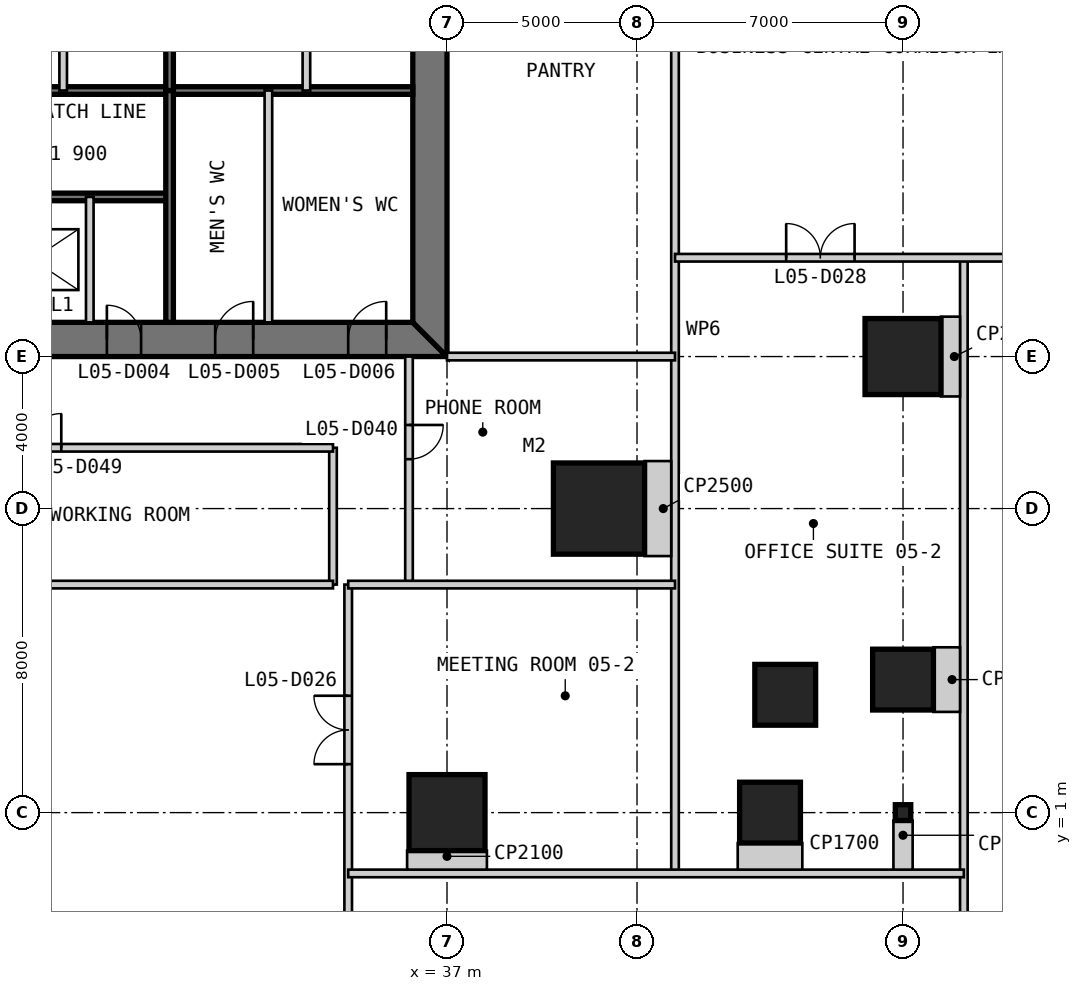
"""IFC4 building model, lengths in metres.
Left out: names, types, materials, properties, quantities, classifications, styles, units other than length and angle.
Written with IfcOpenShell. Run it as: python <this file> out.ifc"""

import sys

from ifc_helpers import new_model, si_unit, direction, frame, frame_2d, origin, origin_2d, place, context, subcontext, project, spatial, polyline, rectangle, i_section, outline, extrude, element, fill, save


model = new_model("IFC4")
c1 = context("Model", 3, precision=1e-05, world=origin(), true_north=direction((0.0, 1.0)))
c2 = subcontext(c1, "Body", "Model", "MODEL_VIEW")
j1 = project(units=[si_unit("LENGTHUNIT", "METRE"), si_unit("PLANEANGLEUNIT", "RADIAN")], contexts=[c1])
p1 = place(None, origin())
s1 = spatial("IfcSite", under=j1, at=p1, CompositionType="ELEMENT")
p2 = place(p1, origin())
s2 = spatial("IfcBuilding", under=s1, at=p2, CompositionType="ELEMENT")
p3 = place(p2, frame((0.0, 0.0, 26.2)))
s3 = spatial("IfcBuildingStorey", under=s2, at=p3, CompositionType="ELEMENT", Elevation=26.2)
p4 = place(p3, frame((41.0, 9.0, 0.0), z_axis=(0.0, 0.0, 1.0), x_axis=(1.0, 0.0, 0.0)))
e1 = element("IfcColumn", 1, at=p4, inside=s3, PredefinedType="COLUMN", context=c2, shape_type="SweptSolid", body=[
    extrude(rectangle(XDim=2.4, YDim=2.4, at=origin_2d()), origin(), (0.0, 0.0, 1.0), 4.8),
])
p5 = place(p3, frame((37.0, 1.0, 0.0), z_axis=(0.0, 0.0, 1.0), x_axis=(1.0, 0.0, 0.0)))
e2 = element("IfcColumn", 2, at=p5, inside=s3, PredefinedType="COLUMN", context=c2, shape_type="SweptSolid", body=[
    extrude(rectangle(XDim=2.0, YDim=2.0, at=origin_2d()), origin(), (0.0, 0.0, 1.0), 4.8),
])
for number, where, z_axis, x_axis in (
    (3, (45.5, 1.0, 0.0), (0.0, 0.0, 1.0), (1.0, 0.0, 0.0)),
    (4, (45.9, 4.1, 0.0), (0.0, 0.0, 1.0), (1.0, 0.0, 0.0)),
    (5, (49.0, 4.5, 0.0), (0.0, 0.0, 1.0), (1.0, 0.0, 0.0)),
):
    element("IfcColumn", number, at=place(p3, frame(where, z_axis=z_axis, x_axis=x_axis)), inside=s3, PredefinedType="COLUMN", context=c2, shape_type="SweptSolid", body=[
        extrude(rectangle(XDim=1.6, YDim=1.6, at=origin_2d()), origin(), (0.0, 0.0, 1.0), 4.8),
    ])
p6 = place(p3, frame((49.0, 13.0, 0.0), z_axis=(0.0, 0.0, 1.0), x_axis=(1.0, 0.0, 0.0)))
e6 = element("IfcColumn", 6, at=p6, inside=s3, PredefinedType="COLUMN", context=c2, shape_type="SweptSolid", body=[
    extrude(rectangle(XDim=2.0, YDim=2.0, at=origin_2d()), origin(), (0.0, 0.0, 1.0), 4.8),
])
p7 = place(p3, frame((49.0, 1.0, 0.0), z_axis=(0.0, 0.0, 1.0), x_axis=(1.0, 0.0, 0.0)))
e7 = element("IfcColumn", 7, at=p7, inside=s3, PredefinedType="COLUMN", context=c2, shape_type="SweptSolid", body=[
    extrude(i_section(OverallWidth=0.406, OverallDepth=0.417, WebThickness=0.03, FlangeThickness=0.048, at=origin_2d()), origin(), (0.0, 0.0, 1.0), 4.8),
])
p8 = place(p3, frame((13.0, 13.45, 0.0), z_axis=(0.0, 0.0, 1.0), x_axis=(1.0, 0.0, 0.0)))
e8 = element("IfcWall", 8, at=p8, inside=s3, PredefinedType="SHEAR", context=c2, shape_type="SweptSolid", body=[
    extrude(outline(polyline([(0.0, -0.45), (24.0, -0.45), (23.1, 0.45), (0.9, 0.45), (0.0, -0.45)])), origin(), (0.0, 0.0, 1.0), 4.8),
])
p9 = place(p8, frame((4.9, 0.0, 0.0)))
e9 = element("IfcOpeningElement", 9, at=p9, cuts=e8, PredefinedType="OPENING", context=c2, shape_type="SweptSolid", body=[
    extrude(rectangle(XDim=1.0, YDim=2.2, at=frame_2d((0.5, 1.1))), frame((0.0, 0.46, 0.0), z_axis=(0.0, -1.0, 0.0), x_axis=(1.0, 0.0, 0.0)), (0.0, 0.0, 1.0), 0.92),
])
p10 = place(p8, frame((8.9, 0.0, 0.0)))
e10 = element("IfcOpeningElement", 10, at=p10, cuts=e8, PredefinedType="OPENING", context=c2, shape_type="SweptSolid", body=[
    extrude(rectangle(XDim=1.1, YDim=2.2, at=frame_2d((0.55, 1.1))), frame((0.0, 0.46, 0.0), z_axis=(0.0, -1.0, 0.0), x_axis=(1.0, 0.0, 0.0)), (0.0, 0.0, 1.0), 0.92),
])
p11 = place(p8, frame((15.05, 0.0, 0.0)))
e11 = element("IfcOpeningElement", 11, at=p11, cuts=e8, PredefinedType="OPENING", context=c2, shape_type="SweptSolid", body=[
    extrude(rectangle(XDim=0.9, YDim=2.2, at=frame_2d((0.45, 1.1))), frame((0.0, 0.46, 0.0), z_axis=(0.0, -1.0, 0.0), x_axis=(1.0, 0.0, 0.0)), (0.0, 0.0, 1.0), 0.92),
])
p12 = place(p8, frame((17.9, 0.0, 0.0)))
e12 = element("IfcOpeningElement", 12, at=p12, cuts=e8, PredefinedType="OPENING", context=c2, shape_type="SweptSolid", body=[
    extrude(rectangle(XDim=1.0, YDim=2.2, at=frame_2d((0.5, 1.1))), frame((0.0, 0.46, 0.0), z_axis=(0.0, -1.0, 0.0), x_axis=(1.0, 0.0, 0.0)), (0.0, 0.0, 1.0), 0.92),
])
p13 = place(p8, frame((21.4, 0.0, 0.0)))
e13 = element("IfcOpeningElement", 13, at=p13, cuts=e8, PredefinedType="OPENING", context=c2, shape_type="SweptSolid", body=[
    extrude(rectangle(XDim=1.0, YDim=2.2, at=frame_2d((0.5, 1.1))), frame((0.0, 0.46, 0.0), z_axis=(0.0, -1.0, 0.0), x_axis=(1.0, 0.0, 0.0)), (0.0, 0.0, 1.0), 0.92),
])
p14 = place(p3, frame((36.55, 13.9, 0.0), z_axis=(0.0, 0.0, 1.0), x_axis=(0.0, 1.0, 0.0)))
e14 = element("IfcWall", 14, at=p14, inside=s3, PredefinedType="SHEAR", context=c2, shape_type="SweptSolid", body=[
    extrude(outline(polyline([(-0.9, -0.45), (23.1, -0.45), (22.2, 0.45), (0.0, 0.45), (-0.9, -0.45)])), origin(), (0.0, 0.0, 1.0), 4.8),
])
p15 = place(p14, frame((20.2, 0.0, 0.0)))
e15 = element("IfcOpeningElement", 15, at=p15, cuts=e14, PredefinedType="OPENING", context=c2, shape_type="SweptSolid", body=[
    extrude(rectangle(XDim=1.0, YDim=2.2, at=frame_2d((0.5, 1.1))), frame((0.0, 0.46, 0.0), z_axis=(0.0, -1.0, 0.0), x_axis=(1.0, 0.0, 0.0)), (0.0, 0.0, 1.0), 0.92),
])
p16 = place(p14, frame((17.25, 0.0, 0.0)))
e16 = element("IfcOpeningElement", 16, at=p16, cuts=e14, PredefinedType="OPENING", context=c2, shape_type="SweptSolid", body=[
    extrude(rectangle(XDim=0.9, YDim=2.2, at=frame_2d((0.45, 1.1))), frame((0.0, 0.46, 0.0), z_axis=(0.0, -1.0, 0.0), x_axis=(1.0, 0.0, 0.0)), (0.0, 0.0, 1.0), 0.92),
])
p17 = place(p3, frame((20.3, 17.2, 0.0), z_axis=(0.0, 0.0, 1.0), x_axis=(1.0, 0.0, 0.0)))
e17 = element("IfcWall", 17, at=p17, inside=s3, PredefinedType="SOLIDWALL", context=c2, shape_type="SweptSolid", body=[
    extrude(rectangle(XDim=9.4, YDim=0.2, at=frame_2d((4.7, 0.0))), origin(), (0.0, 0.0, 1.0), 4.6),
])
p18 = place(p17, frame((0.25, 0.0, 0.0)))
e18 = element("IfcOpeningElement", 18, at=p18, cuts=e17, PredefinedType="OPENING", context=c2, shape_type="SweptSolid", body=[
    extrude(rectangle(XDim=1.0, YDim=2.2, at=frame_2d((0.5, 1.1))), frame((0.0, 0.11, 0.0), z_axis=(0.0, -1.0, 0.0), x_axis=(1.0, 0.0, 0.0)), (0.0, 0.0, 1.0), 0.22),
])
p19 = place(p3, frame((20.3, 20.0, 0.0), z_axis=(0.0, 0.0, 1.0), x_axis=(1.0, 0.0, 0.0)))
e19 = element("IfcWall", 19, at=p19, inside=s3, PredefinedType="SOLIDWALL", context=c2, shape_type="SweptSolid", body=[
    extrude(rectangle(XDim=15.8, YDim=0.2, at=frame_2d((7.9, 0.0))), origin(), (0.0, 0.0, 1.0), 4.6),
])
p20 = place(p3, frame((27.6, 13.9, 0.0), z_axis=(0.0, 0.0, 1.0), x_axis=(0.0, 1.0, 0.0)))
e20 = element("IfcWall", 20, at=p20, inside=s3, PredefinedType="PARTITIONING", context=c2, shape_type="SweptSolid", body=[
    extrude(rectangle(XDim=3.3, YDim=0.2, at=frame_2d((1.65, 0.0))), origin(), (0.0, 0.0, 1.0), 4.6),
])
p21 = place(p3, frame((29.7, 13.9, 0.0), z_axis=(0.0, 0.0, 1.0), x_axis=(0.0, 1.0, 0.0)))
e21 = element("IfcWall", 21, at=p21, inside=s3, PredefinedType="SOLIDWALL", context=c2, shape_type="SweptSolid", body=[
    extrude(rectangle(XDim=6.1, YDim=0.2, at=frame_2d((3.05, 0.0))), origin(), (0.0, 0.0, 1.0), 4.6),
])
p22 = place(p3, frame((32.3, 13.9, 0.0), z_axis=(0.0, 0.0, 1.0), x_axis=(0.0, 1.0, 0.0)))
e22 = element("IfcWall", 22, at=p22, inside=s3, PredefinedType="PARTITIONING", context=c2, shape_type="SweptSolid", body=[
    extrude(rectangle(XDim=6.1, YDim=0.2, at=frame_2d((3.05, 0.0))), origin(), (0.0, 0.0, 1.0), 4.6),
])
p23 = place(p3, frame((33.3, 36.1, 0.0), z_axis=(0.0, 0.0, 1.0), x_axis=(0.0, -1.0, 0.0)))
e23 = element("IfcWall", 23, at=p23, inside=s3, PredefinedType="PARTITIONING", context=c2, shape_type="SweptSolid", body=[
    extrude(rectangle(XDim=16.1, YDim=0.2, at=frame_2d((8.05, 0.0))), origin(), (0.0, 0.0, 1.0), 4.6),
])
p24 = place(p23, frame((4.4, 0.0, 0.0)))
e24 = element("IfcOpeningElement", 24, at=p24, cuts=e23, PredefinedType="OPENING", context=c2, shape_type="SweptSolid", body=[
    extrude(rectangle(XDim=0.9, YDim=2.2, at=frame_2d((0.45, 1.1))), frame((0.0, 0.11, 0.0), z_axis=(0.0, -1.0, 0.0), x_axis=(1.0, 0.0, 0.0)), (0.0, 0.0, 1.0), 0.22),
])
p25 = place(p3, frame((29.7, 36.1, 0.0), z_axis=(0.0, 0.0, 1.0), x_axis=(0.0, -1.0, 0.0)))
e25 = element("IfcWall", 25, at=p25, inside=s3, PredefinedType="SOLIDWALL", context=c2, shape_type="SweptSolid", body=[
    extrude(rectangle(XDim=16.1, YDim=0.2, at=frame_2d((8.05, 0.0))), origin(), (0.0, 0.0, 1.0), 4.6),
])
p26 = place(p3, frame((26.9, 30.0, 0.0), z_axis=(0.0, 0.0, 1.0), x_axis=(0.0, -1.0, 0.0)))
e26 = element("IfcWall", 26, at=p26, inside=s3, PredefinedType="PARTITIONING", context=c2, shape_type="SweptSolid", body=[
    extrude(rectangle(XDim=10.0, YDim=0.2, at=frame_2d((5.0, 0.0))), origin(), (0.0, 0.0, 1.0), 4.6),
])
p27 = place(p3, frame((34.0, 7.0, 0.0), z_axis=(0.0, 0.0, 1.0), x_axis=(0.0, 1.0, 0.0)))
e27 = element("IfcWall", 27, at=p27, inside=s3, PredefinedType="PARTITIONING", context=c2, shape_type="SweptSolid", body=[
    extrude(rectangle(XDim=3.6, YDim=0.2, at=frame_2d((1.8, 0.0))), origin(), (0.0, 0.0, 1.0), 3.893),
])
p28 = place(p3, frame((34.4, -7.25, 0.0), z_axis=(0.0, 0.0, 1.0), x_axis=(0.0, 1.0, 0.0)))
e28 = element("IfcWall", 28, at=p28, inside=s3, PredefinedType="PARTITIONING", context=c2, shape_type="SweptSolid", body=[
    extrude(rectangle(XDim=14.25, YDim=0.2, at=frame_2d((7.125, 0.0))), origin(), (0.0, 0.0, 1.0), 4.5),
])
p29 = place(p28, frame((2.45, 0.0, 0.0)))
e29 = element("IfcOpeningElement", 29, at=p29, cuts=e28, PredefinedType="OPENING", context=c2, shape_type="SweptSolid", body=[
    extrude(rectangle(XDim=1.8, YDim=2.4, at=frame_2d((0.9, 1.2))), frame((0.0, 0.11, 0.0), z_axis=(0.0, -1.0, 0.0), x_axis=(1.0, 0.0, 0.0)), (0.0, 0.0, 1.0), 0.22),
])
p30 = place(p28, frame((9.525, 0.0, 0.0)))
e30 = element("IfcOpeningElement", 30, at=p30, cuts=e28, PredefinedType="OPENING", context=c2, shape_type="SweptSolid", body=[
    extrude(rectangle(XDim=1.8, YDim=2.4, at=frame_2d((0.9, 1.2))), frame((0.0, 0.11, 0.0), z_axis=(0.0, -1.0, 0.0), x_axis=(1.0, 0.0, 0.0)), (0.0, 0.0, 1.0), 0.22),
])
p31 = place(p3, frame((36.0, 7.0, 0.0), z_axis=(0.0, 0.0, 1.0), x_axis=(0.0, 1.0, 0.0)))
e31 = element("IfcWall", 31, at=p31, inside=s3, PredefinedType="PARTITIONING", context=c2, shape_type="SweptSolid", body=[
    extrude(rectangle(XDim=6.0, YDim=0.2, at=frame_2d((3.0, 0.0))), origin(), (0.0, 0.0, 1.0), 4.5),
])
p32 = place(p31, frame((3.3, 0.0, 0.0)))
e32 = element("IfcOpeningElement", 32, at=p32, cuts=e31, PredefinedType="OPENING", context=c2, shape_type="SweptSolid", body=[
    extrude(rectangle(XDim=0.9, YDim=2.2, at=frame_2d((0.45, 1.1))), frame((0.0, 0.11, 0.0), z_axis=(0.0, -1.0, 0.0), x_axis=(1.0, 0.0, 0.0)), (0.0, 0.0, 1.0), 0.22),
])
p33 = place(p3, frame((43.0, -0.6, 0.0), z_axis=(0.0, 0.0, 1.0), x_axis=(0.0, 1.0, 0.0)))
e33 = element("IfcWall", 33, at=p33, inside=s3, PredefinedType="PARTITIONING", context=c2, shape_type="SweptSolid", body=[
    extrude(rectangle(XDim=28.6, YDim=0.2, at=frame_2d((14.3, 0.0))), origin(), (0.0, 0.0, 1.0), 3.893),
])
p34 = place(p3, frame((50.6, -7.25, 0.0), z_axis=(0.0, 0.0, 1.0), x_axis=(0.0, 1.0, 0.0)))
e34 = element("IfcWall", 34, at=p34, inside=s3, PredefinedType="PARTITIONING", context=c2, shape_type="SweptSolid", body=[
    extrude(rectangle(XDim=22.85, YDim=0.2, at=frame_2d((11.425, 0.0))), origin(), (0.0, 0.0, 1.0), 4.5),
])
p35 = place(p3, frame((34.4, -0.6, 0.0), z_axis=(0.0, 0.0, 1.0), x_axis=(1.0, 0.0, 0.0)))
e35 = element("IfcWall", 35, at=p35, inside=s3, PredefinedType="PARTITIONING", context=c2, shape_type="SweptSolid", body=[
    extrude(rectangle(XDim=16.2, YDim=0.2, at=frame_2d((8.1, 0.0))), origin(), (0.0, 0.0, 1.0), 4.5),
])
p36 = place(p3, frame((-0.6, 7.0, 0.0), z_axis=(0.0, 0.0, 1.0), x_axis=(1.0, 0.0, 0.0)))
e36 = element("IfcWall", 36, at=p36, inside=s3, PredefinedType="PARTITIONING", context=c2, shape_type="SweptSolid", body=[
    extrude(rectangle(XDim=34.6, YDim=0.2, at=frame_2d((17.3, 0.0))), origin(), (0.0, 0.0, 1.0), 4.5),
])
p37 = place(p36, frame((14.15, 0.0, 0.0)))
e37 = element("IfcOpeningElement", 37, at=p37, cuts=e36, PredefinedType="OPENING", context=c2, shape_type="SweptSolid", body=[
    extrude(rectangle(XDim=0.9, YDim=2.2, at=frame_2d((0.45, 1.1))), frame((0.0, 0.11, 0.0), z_axis=(0.0, -1.0, 0.0), x_axis=(1.0, 0.0, 0.0)), (0.0, 0.0, 1.0), 0.22),
])
p38 = place(p3, frame((34.4, 7.0, 0.0), z_axis=(0.0, 0.0, 1.0), x_axis=(1.0, 0.0, 0.0)))
e38 = element("IfcWall", 38, at=p38, inside=s3, PredefinedType="PARTITIONING", context=c2, shape_type="SweptSolid", body=[
    extrude(rectangle(XDim=8.6, YDim=0.2, at=frame_2d((4.3, 0.0))), origin(), (0.0, 0.0, 1.0), 4.5),
])
p39 = place(p3, frame((16.4, 10.6, 0.0), z_axis=(0.0, 0.0, 1.0), x_axis=(1.0, 0.0, 0.0)))
e39 = element("IfcWall", 39, at=p39, inside=s3, PredefinedType="PARTITIONING", context=c2, shape_type="SweptSolid", body=[
    extrude(rectangle(XDim=17.6, YDim=0.2, at=frame_2d((8.8, 0.0))), origin(), (0.0, 0.0, 1.0), 4.5),
])
p40 = place(p39, frame((8.65, 0.0, 0.0)))
e40 = element("IfcOpeningElement", 40, at=p40, cuts=e39, PredefinedType="OPENING", context=c2, shape_type="SweptSolid", body=[
    extrude(rectangle(XDim=1.8, YDim=2.4, at=frame_2d((0.9, 1.2))), frame((0.0, 0.11, 0.0), z_axis=(0.0, -1.0, 0.0), x_axis=(1.0, 0.0, 0.0)), (0.0, 0.0, 1.0), 0.22),
])
p41 = place(p3, frame((37.0, 13.0, 0.0), z_axis=(0.0, 0.0, 1.0), x_axis=(1.0, 0.0, 0.0)))
e41 = element("IfcWall", 41, at=p41, inside=s3, PredefinedType="PARTITIONING", context=c2, shape_type="SweptSolid", body=[
    extrude(rectangle(XDim=6.0, YDim=0.2, at=frame_2d((3.0, 0.0))), origin(), (0.0, 0.0, 1.0), 3.703),
])
p42 = place(p3, frame((43.0, 15.6, 0.0), z_axis=(0.0, 0.0, 1.0), x_axis=(1.0, 0.0, 0.0)))
e42 = element("IfcWall", 42, at=p42, inside=s3, PredefinedType="PARTITIONING", context=c2, shape_type="SweptSolid", body=[
    extrude(rectangle(XDim=14.25, YDim=0.2, at=frame_2d((7.125, 0.0))), origin(), (0.0, 0.0, 1.0), 4.5),
])
p43 = place(p42, frame((10.0, 0.0, 0.0)))
e43 = element("IfcOpeningElement", 43, at=p43, cuts=e42, PredefinedType="OPENING", context=c2, shape_type="SweptSolid", body=[
    extrude(rectangle(XDim=1.8, YDim=2.4, at=frame_2d((0.9, 1.2))), frame((0.0, 0.11, 0.0), z_axis=(0.0, -1.0, 0.0), x_axis=(1.0, 0.0, 0.0)), (0.0, 0.0, 1.0), 0.22),
])
p44 = place(p42, frame((2.925, 0.0, 0.0)))
e44 = element("IfcOpeningElement", 44, at=p44, cuts=e42, PredefinedType="OPENING", context=c2, shape_type="SweptSolid", body=[
    extrude(rectangle(XDim=1.8, YDim=2.4, at=frame_2d((0.9, 1.2))), frame((0.0, 0.11, 0.0), z_axis=(0.0, -1.0, 0.0), x_axis=(1.0, 0.0, 0.0)), (0.0, 0.0, 1.0), 0.22),
])
p45 = place(p3, frame((37.0, -0.5, 0.0), z_axis=(0.0, 0.0, 1.0), x_axis=(0.0, 1.0, 0.0)))
e45 = element("IfcWall", 45, at=p45, inside=s3, PredefinedType="PARTITIONING", context=c2, shape_type="SweptSolid", body=[
    extrude(rectangle(XDim=0.5, YDim=2.1, at=frame_2d((0.25, 0.0))), origin(), (0.0, 0.0, 1.0), 4.5),
])
for number, where, z_axis, x_axis in (
    (46, (45.5, -0.5, 0.0), (0.0, 0.0, 1.0), (0.0, 1.0, 0.0)),
    (47, (50.5, 4.5, 0.0), (0.0, 0.0, 1.0), (-1.0, 0.0, 0.0)),
):
    element("IfcWall", number, at=place(p3, frame(where, z_axis=z_axis, x_axis=x_axis)), inside=s3, PredefinedType="PARTITIONING", context=c2, shape_type="SweptSolid", body=[
        extrude(rectangle(XDim=0.7, YDim=1.7, at=frame_2d((0.35, 0.0))), origin(), (0.0, 0.0, 1.0), 4.5),
    ])
p46 = place(p3, frame((50.5, 13.0, 0.0), z_axis=(0.0, 0.0, 1.0), x_axis=(-1.0, 0.0, 0.0)))
e48 = element("IfcWall", 48, at=p46, inside=s3, PredefinedType="PARTITIONING", context=c2, shape_type="SweptSolid", body=[
    extrude(rectangle(XDim=0.5, YDim=2.1, at=frame_2d((0.25, 0.0))), origin(), (0.0, 0.0, 1.0), 4.5),
])
p47 = place(p3, frame((49.0, -0.5, 0.0), z_axis=(0.0, 0.0, 1.0), x_axis=(0.0, 1.0, 0.0)))
e49 = element("IfcWall", 49, at=p47, inside=s3, PredefinedType="PARTITIONING", context=c2, shape_type="SweptSolid", body=[
    extrude(rectangle(XDim=1.292, YDim=0.506, at=frame_2d((0.646, 0.0))), origin(), (0.0, 0.0, 1.0), 3.654),
])
p48 = place(p3, frame((42.9, 9.0, 0.0), z_axis=(0.0, 0.0, 1.0), x_axis=(-1.0, 0.0, 0.0)))
e50 = element("IfcWall", 50, at=p48, inside=s3, PredefinedType="PARTITIONING", context=c2, shape_type="SweptSolid", body=[
    extrude(rectangle(XDim=0.7, YDim=2.5, at=frame_2d((0.35, 0.0))), origin(), (0.0, 0.0, 1.0), 4.5),
])
p49 = place(p11, origin())
e51 = element("IfcDoor", 51, at=p49, inside=s3, OperationType="SINGLE_SWING_LEFT", PredefinedType="DOOR", context=c2, shape_type="SweptSolid", body=[
    extrude(rectangle(XDim=0.9, YDim=2.2, at=frame_2d((0.45, 1.1))), frame((0.0, 0.025, 0.0), z_axis=(0.0, -1.0, 0.0), x_axis=(1.0, 0.0, 0.0)), (0.0, 0.0, 1.0), 0.05),
    extrude(outline(polyline([(0.0, 0.0), (0.04, 0.0), (0.04, 2.16), (0.86, 2.16), (0.86, 0.0), (0.9, 0.0), (0.9, 2.2), (0.0, 2.2), (0.0, 0.0)])), frame((0.0, 0.3, 0.0), z_axis=(0.0, -1.0, 0.0), x_axis=(1.0, 0.0, 0.0)), (0.0, 0.0, 1.0), 0.6),
])
fill(e11, e51)
p50 = place(p12, origin())
e52 = element("IfcDoor", 52, at=p50, inside=s3, OperationType="SINGLE_SWING_RIGHT", PredefinedType="DOOR", context=c2, shape_type="SweptSolid", body=[
    extrude(rectangle(XDim=1.0, YDim=2.2, at=frame_2d((0.5, 1.1))), frame((0.0, 0.025, 0.0), z_axis=(0.0, -1.0, 0.0), x_axis=(1.0, 0.0, 0.0)), (0.0, 0.0, 1.0), 0.05),
    extrude(outline(polyline([(0.0, 0.0), (0.04, 0.0), (0.04, 2.16), (0.96, 2.16), (0.96, 0.0), (1.0, 0.0), (1.0, 2.2), (0.0, 2.2), (0.0, 0.0)])), frame((0.0, 0.3, 0.0), z_axis=(0.0, -1.0, 0.0), x_axis=(1.0, 0.0, 0.0)), (0.0, 0.0, 1.0), 0.6),
])
fill(e12, e52)
p51 = place(p13, origin())
e53 = element("IfcDoor", 53, at=p51, inside=s3, OperationType="SINGLE_SWING_RIGHT", PredefinedType="DOOR", context=c2, shape_type="SweptSolid", body=[
    extrude(rectangle(XDim=1.0, YDim=2.2, at=frame_2d((0.5, 1.1))), frame((0.0, 0.025, 0.0), z_axis=(0.0, -1.0, 0.0), x_axis=(1.0, 0.0, 0.0)), (0.0, 0.0, 1.0), 0.05),
    extrude(outline(polyline([(0.0, 0.0), (0.04, 0.0), (0.04, 2.16), (0.96, 2.16), (0.96, 0.0), (1.0, 0.0), (1.0, 2.2), (0.0, 2.2), (0.0, 0.0)])), frame((0.0, 0.3, 0.0), z_axis=(0.0, -1.0, 0.0), x_axis=(1.0, 0.0, 0.0)), (0.0, 0.0, 1.0), 0.6),
])
fill(e13, e53)
p52 = place(p30, origin())
e54 = element("IfcDoor", 54, at=p52, inside=s3, OperationType="DOUBLE_DOOR_SINGLE_SWING", PredefinedType="DOOR", context=c2, shape_type="SweptSolid", body=[
    extrude(rectangle(XDim=1.8, YDim=2.4, at=frame_2d((0.9, 1.2))), frame((0.0, 0.025, 0.0), z_axis=(0.0, -1.0, 0.0), x_axis=(1.0, 0.0, 0.0)), (0.0, 0.0, 1.0), 0.05),
])
fill(e30, e54)
p53 = place(p44, origin())
e55 = element("IfcDoor", 55, at=p53, inside=s3, OperationType="DOUBLE_DOOR_SINGLE_SWING", PredefinedType="DOOR", context=c2, shape_type="SweptSolid", body=[
    extrude(rectangle(XDim=1.8, YDim=2.4, at=frame_2d((0.9, 1.2))), frame((0.0, 0.025, 0.0), z_axis=(0.0, -1.0, 0.0), x_axis=(1.0, 0.0, 0.0)), (0.0, 0.0, 1.0), 0.05),
])
fill(e44, e55)
p54 = place(p32, frame((0.9, 0.0, 0.0), z_axis=(0.0, 0.0, 1.0), x_axis=(-1.0, 0.0, 0.0)))
e56 = element("IfcDoor", 56, at=p54, inside=s3, OperationType="SINGLE_SWING_LEFT", PredefinedType="DOOR", context=c2, shape_type="SweptSolid", body=[
    extrude(rectangle(XDim=0.9, YDim=2.2, at=frame_2d((0.45, 1.1))), frame((0.0, 0.025, 0.0), z_axis=(0.0, -1.0, 0.0), x_axis=(1.0, 0.0, 0.0)), (0.0, 0.0, 1.0), 0.05),
])
fill(e32, e56)
p55 = place(p40, origin())
e57 = element("IfcDoor", 57, at=p55, inside=s3, OperationType="DOUBLE_DOOR_SINGLE_SWING", PredefinedType="DOOR", context=c2, shape_type="SweptSolid", body=[
    extrude(rectangle(XDim=1.8, YDim=2.4, at=frame_2d((0.9, 1.2))), frame((0.0, 0.025, 0.0), z_axis=(0.0, -1.0, 0.0), x_axis=(1.0, 0.0, 0.0)), (0.0, 0.0, 1.0), 0.05),
])
fill(e40, e57)
save(model, sys.argv[1])
